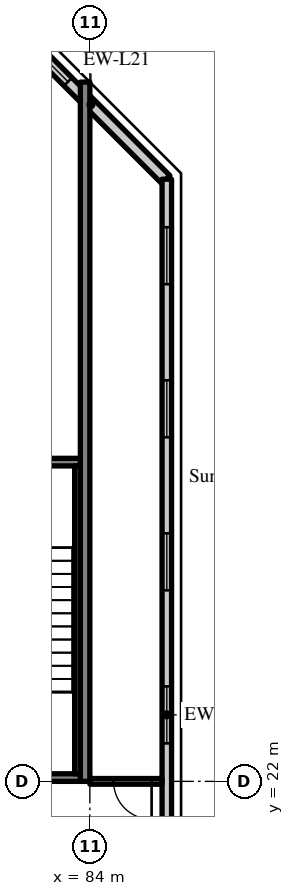
"""IFC4 building model, lengths in metres.
Left out: names, types, materials, properties, quantities, classifications, styles, units other than length and angle.
Written with IfcOpenShell. Run it as: python <this file> out.ifc"""

import sys

from ifc_helpers import new_model, si_unit, direction, frame, frame_2d, origin, place, context, subcontext, project, spatial, rectangle, extrude, source, transform, mapped, element, fill, save


model = new_model("IFC4")
c1 = context("Model", 3, precision=1e-05, world=origin(), true_north=direction((0.0, 1.0)))
c2 = subcontext(c1, "Body", "Model", "MODEL_VIEW")
j1 = project(units=[si_unit("LENGTHUNIT", "METRE"), si_unit("PLANEANGLEUNIT", "RADIAN")], contexts=[c1])
p1 = place(None, origin())
s1 = spatial("IfcSite", under=j1, at=p1, CompositionType="ELEMENT")
p2 = place(p1, origin())
s2 = spatial("IfcBuilding", under=s1, at=p2, CompositionType="ELEMENT")
p3 = place(p2, frame((0.0, 0.0, 281.7)))
s3 = spatial("IfcBuildingStorey", under=s2, at=p3, CompositionType="ELEMENT", Elevation=281.7)
m1 = source(origin(), c2, "Body", "SweptSolid", [
    extrude(rectangle(XDim=18.4, YDim=0.25, at=frame_2d((9.2, 0.0))), origin(), (0.0, 0.0, 1.0), 3.72),
])
p4 = place(p3, frame((83.875, 22.0, 0.0), z_axis=(0.0, 0.0, 1.0), x_axis=(0.0, 1.0, 0.0)))
e1 = element("IfcWall", 1, at=p4, inside=s3, PredefinedType="SHEAR", context=c2, shape_type="MappedRepresentation", body=[
    mapped(m1, transform((0.0, 0.0, 0.0), scale=1.0)),
])
m2 = source(origin(), c2, "Body", "SweptSolid", [
    extrude(rectangle(XDim=5.576, YDim=0.3, at=frame_2d((2.788, 0.0))), origin(), (0.0, 0.0, 1.0), 3.72),
])
p5 = place(p3, frame((86.0, 37.834, 0.0), z_axis=(0.0, 0.0, 1.0), x_axis=(-0.707106781187, 0.707106781187, 0.0)))
e2 = element("IfcWall", 2, at=p5, inside=s3, PredefinedType="SOLIDWALL", context=c2, shape_type="MappedRepresentation", body=[
    mapped(m2, transform((0.0, 0.0, 0.0), scale=1.0)),
])
m3 = source(origin(), c2, "Body", "SweptSolid", [
    extrude(rectangle(XDim=1.8, YDim=1.5, at=frame_2d((0.9, 0.75))), frame((0.0, 0.16, 0.0), z_axis=(0.0, -1.0, 0.0), x_axis=(1.0, 0.0, 0.0)), (0.0, 0.0, 1.0), 0.32),
])
p6 = place(p5, frame((3.641, 0.0, 0.9)))
e3 = element("IfcOpeningElement", 3, at=p6, cuts=e2, PredefinedType="OPENING", context=c2, shape_type="MappedRepresentation", body=[
    mapped(m3, transform((0.0, 0.0, 0.0), scale=1.0)),
])
m4 = source(origin(), c2, "Body", "SweptSolid", [
    extrude(rectangle(XDim=28.189, YDim=0.25, at=frame_2d((14.095, 0.0))), origin(), (0.0, 0.0, 1.0), 3.72),
])
p7 = place(p3, frame((86.025, 9.655, 0.0), z_axis=(0.0, 0.0, 1.0), x_axis=(0.0, 1.0, 0.0)))
e4 = element("IfcWall", 4, at=p7, inside=s3, PredefinedType="SOLIDWALL", context=c2, shape_type="MappedRepresentation", body=[
    mapped(m4, transform((0.0, 0.0, 0.0), scale=1.0)),
])
m5 = source(origin(), c2, "Body", "SweptSolid", [
    extrude(rectangle(XDim=1.5, YDim=1.5, at=frame_2d((0.75, 0.75))), frame((0.0, 0.135, 0.0), z_axis=(0.0, -1.0, 0.0), x_axis=(1.0, 0.0, 0.0)), (0.0, 0.0, 1.0), 0.27),
])
p8 = place(p7, frame((1.263, 0.0, 0.9)))
e5 = element("IfcOpeningElement", 5, at=p8, cuts=e4, PredefinedType="OPENING", context=c2, shape_type="MappedRepresentation", body=[
    mapped(m5, transform((0.0, 0.0, 0.0), scale=1.0)),
])
p9 = place(p7, frame((5.291, 0.0, 0.9)))
e6 = element("IfcOpeningElement", 6, at=p9, cuts=e4, PredefinedType="OPENING", context=c2, shape_type="MappedRepresentation", body=[
    mapped(m5, transform((0.0, 0.0, 0.0), scale=1.0)),
])
p10 = place(p7, frame((9.318, 0.0, 0.9)))
e7 = element("IfcOpeningElement", 7, at=p10, cuts=e4, PredefinedType="OPENING", context=c2, shape_type="MappedRepresentation", body=[
    mapped(m5, transform((0.0, 0.0, 0.0), scale=1.0)),
])
p11 = place(p7, frame((13.345, 0.0, 0.9)))
e8 = element("IfcOpeningElement", 8, at=p11, cuts=e4, PredefinedType="OPENING", context=c2, shape_type="MappedRepresentation", body=[
    mapped(m5, transform((0.0, 0.0, 0.0), scale=1.0)),
])
p12 = place(p7, frame((17.372, 0.0, 0.9)))
e9 = element("IfcOpeningElement", 9, at=p12, cuts=e4, PredefinedType="OPENING", context=c2, shape_type="MappedRepresentation", body=[
    mapped(m5, transform((0.0, 0.0, 0.0), scale=1.0)),
])
p13 = place(p7, frame((21.399, 0.0, 0.9)))
e10 = element("IfcOpeningElement", 10, at=p13, cuts=e4, PredefinedType="OPENING", context=c2, shape_type="MappedRepresentation", body=[
    mapped(m5, transform((0.0, 0.0, 0.0), scale=1.0)),
])
p14 = place(p7, frame((25.426, 0.0, 0.9)))
e11 = element("IfcOpeningElement", 11, at=p14, cuts=e4, PredefinedType="OPENING", context=c2, shape_type="MappedRepresentation", body=[
    mapped(m5, transform((0.0, 0.0, 0.0), scale=1.0)),
])
m6 = source(origin(), c2, "Body", "SweptSolid", [
    extrude(rectangle(XDim=8.15, YDim=0.2, at=frame_2d((4.075, 0.0))), origin(), (0.0, 0.0, 1.0), 3.72),
])
p15 = place(p3, frame((83.75, 22.1, 0.0), z_axis=(0.0, 0.0, 1.0), x_axis=(-1.0, 0.0, 0.0)))
e12 = element("IfcWall", 12, at=p15, inside=s3, PredefinedType="SOLIDWALL", context=c2, shape_type="MappedRepresentation", body=[
    mapped(m6, transform((0.0, 0.0, 0.0), scale=1.0)),
])
m7 = source(origin(), c2, "Body", "SweptSolid", [
    extrude(rectangle(XDim=1.2, YDim=2.1, at=frame_2d((0.6, 1.05))), frame((0.0, 0.11, 0.0), z_axis=(0.0, -1.0, 0.0), x_axis=(1.0, 0.0, 0.0)), (0.0, 0.0, 1.0), 0.22),
])
p16 = place(p15, frame((5.95, 0.0, 0.0)))
e13 = element("IfcOpeningElement", 13, at=p16, cuts=e12, PredefinedType="OPENING", context=c2, shape_type="MappedRepresentation", body=[
    mapped(m7, transform((0.0, 0.0, 0.0), scale=1.0)),
])
p17 = place(p3, frame((83.75, 30.4, 0.0), z_axis=(0.0, 0.0, 1.0), x_axis=(-1.0, 0.0, 0.0)))
e14 = element("IfcWall", 14, at=p17, inside=s3, PredefinedType="SOLIDWALL", context=c2, shape_type="MappedRepresentation", body=[
    mapped(m6, transform((0.0, 0.0, 0.0), scale=1.0)),
])
m8 = source(origin(), c2, "Body", "SweptSolid", [
    extrude(rectangle(XDim=1.0, YDim=2.1, at=frame_2d((0.5, 1.05))), frame((0.0, 0.11, 0.0), z_axis=(0.0, -1.0, 0.0), x_axis=(1.0, 0.0, 0.0)), (0.0, 0.0, 1.0), 0.22),
])
p18 = place(p17, frame((6.05, 0.0, 0.0)))
e15 = element("IfcOpeningElement", 15, at=p18, cuts=e14, PredefinedType="OPENING", context=c2, shape_type="MappedRepresentation", body=[
    mapped(m8, transform((0.0, 0.0, 0.0), scale=1.0)),
])
m9 = source(origin(), c2, "Body", "SweptSolid", [
    extrude(rectangle(XDim=8.1, YDim=0.15, at=frame_2d((4.05, 0.0))), origin(), (0.0, 0.0, 1.0), 3.72),
])
p19 = place(p3, frame((83.675, 22.2, 0.0), z_axis=(0.0, 0.0, 1.0), x_axis=(0.0, 1.0, 0.0)))
e16 = element("IfcWall", 16, at=p19, inside=s3, PredefinedType="SOLIDWALL", context=c2, shape_type="MappedRepresentation", body=[
    mapped(m9, transform((0.0, 0.0, 0.0), scale=1.0)),
])
m10 = source(origin(), c2, "Body", "SweptSolid", [
    extrude(rectangle(XDim=1.9, YDim=0.15, at=frame_2d((0.95, 0.0))), origin(), (0.0, 0.0, 1.0), 3.02),
])
p20 = place(p3, frame((84.0, 22.0, 0.0), z_axis=(0.0, 0.0, 1.0), x_axis=(1.0, 0.0, 0.0)))
e17 = element("IfcWall", 17, at=p20, inside=s3, PredefinedType="PARTITIONING", context=c2, shape_type="MappedRepresentation", body=[
    mapped(m10, transform((0.0, 0.0, 0.0), scale=1.0)),
])
m11 = source(origin(), c2, "Body", "SweptSolid", [
    extrude(rectangle(XDim=1.0, YDim=2.1, at=frame_2d((0.5, 1.05))), frame((0.0, 0.085, 0.0), z_axis=(0.0, -1.0, 0.0), x_axis=(1.0, 0.0, 0.0)), (0.0, 0.0, 1.0), 0.17),
])
p21 = place(p20, frame((0.625, 0.0, 0.0)))
e18 = element("IfcOpeningElement", 18, at=p21, cuts=e17, PredefinedType="OPENING", context=c2, shape_type="MappedRepresentation", body=[
    mapped(m11, transform((0.0, 0.0, 0.0), scale=1.0)),
])
m12 = source(origin(), c2, "Body", "SweptSolid", [
    extrude(rectangle(XDim=1.8, YDim=1.5, at=frame_2d((0.9, 0.75))), frame((0.0, 0.03, 0.0), z_axis=(0.0, -1.0, 0.0), x_axis=(1.0, 0.0, 0.0)), (0.0, 0.0, 1.0), 0.06),
])
p22 = place(p6, origin())
e19 = element("IfcWindow", 19, at=p22, inside=s3, PartitioningType="SINGLE_PANEL", PredefinedType="WINDOW", context=c2, shape_type="MappedRepresentation", body=[
    mapped(m12, transform((0.0, 0.0, 0.0), scale=1.0)),
])
fill(e3, e19)
m13 = source(origin(), c2, "Body", "SweptSolid", [
    extrude(rectangle(XDim=1.5, YDim=1.5, at=frame_2d((0.75, 0.75))), frame((0.0, 0.03, 0.0), z_axis=(0.0, -1.0, 0.0), x_axis=(1.0, 0.0, 0.0)), (0.0, 0.0, 1.0), 0.06),
])
p23 = place(p11, origin())
e20 = element("IfcWindow", 20, at=p23, inside=s3, PartitioningType="SINGLE_PANEL", PredefinedType="WINDOW", context=c2, shape_type="MappedRepresentation", body=[
    mapped(m13, transform((0.0, 0.0, 0.0), scale=1.0)),
])
fill(e8, e20)
p24 = place(p12, origin())
e21 = element("IfcWindow", 21, at=p24, inside=s3, PartitioningType="SINGLE_PANEL", PredefinedType="WINDOW", context=c2, shape_type="MappedRepresentation", body=[
    mapped(m13, transform((0.0, 0.0, 0.0), scale=1.0)),
])
fill(e9, e21)
p25 = place(p13, origin())
e22 = element("IfcWindow", 22, at=p25, inside=s3, PartitioningType="SINGLE_PANEL", PredefinedType="WINDOW", context=c2, shape_type="MappedRepresentation", body=[
    mapped(m13, transform((0.0, 0.0, 0.0), scale=1.0)),
])
fill(e10, e22)
p26 = place(p14, origin())
e23 = element("IfcWindow", 23, at=p26, inside=s3, PartitioningType="SINGLE_PANEL", PredefinedType="WINDOW", context=c2, shape_type="MappedRepresentation", body=[
    mapped(m13, transform((0.0, 0.0, 0.0), scale=1.0)),
])
fill(e11, e23)
m14 = source(origin(), c2, "Body", "SweptSolid", [
    extrude(rectangle(XDim=1.0, YDim=2.1, at=frame_2d((0.5, 1.05))), frame((0.0, 0.025, 0.0), z_axis=(0.0, -1.0, 0.0), x_axis=(1.0, 0.0, 0.0)), (0.0, 0.0, 1.0), 0.05),
])
p27 = place(p21, origin())
e24 = element("IfcDoor", 24, at=p27, inside=s3, OperationType="SINGLE_SWING_RIGHT", PredefinedType="DOOR", context=c2, shape_type="MappedRepresentation", body=[
    mapped(m14, transform((0.0, 0.0, 0.0), scale=1.0)),
])
fill(e18, e24)
save(model, sys.argv[1])
